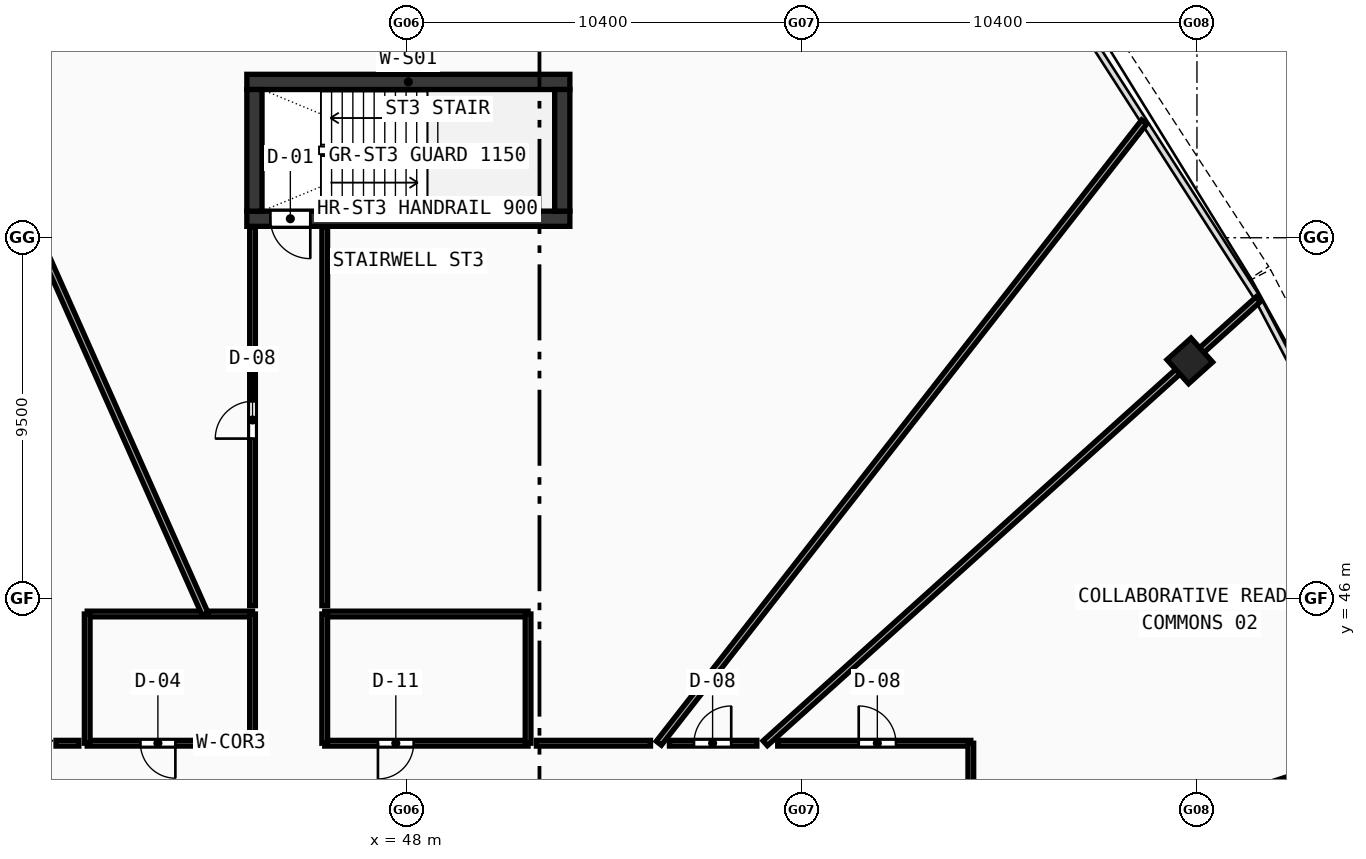
"""IFC4 building model, lengths in metres.
Left out: names, types, materials, properties, quantities, classifications, styles, units other than length and angle.
Written with IfcOpenShell. Run it as: python <this file> out.ifc"""

import sys

from ifc_helpers import new_model, si_unit, direction, frame, frame_2d, origin, origin_with_axes, origin_2d, place, context, subcontext, project, spatial, rectangle, hollow_rectangle, extrude, source, transform, mapped, element, fill, save


model = new_model("IFC4")
c1 = context("Model", 3, precision=1e-05, world=origin(), true_north=direction((0.0, 1.0)))
c2 = subcontext(c1, "Body", "Model", "MODEL_VIEW")
j1 = project(units=[si_unit("LENGTHUNIT", "METRE"), si_unit("PLANEANGLEUNIT", "RADIAN")], contexts=[c1])
p1 = place(None, origin())
s1 = spatial("IfcSite", under=j1, at=p1, CompositionType="ELEMENT")
p2 = place(p1, origin())
s2 = spatial("IfcBuilding", under=s1, at=p2, CompositionType="ELEMENT")
p3 = place(p2, frame((0.0, 0.0, 244.53)))
s3 = spatial("IfcBuildingStorey", under=s2, at=p3, CompositionType="ELEMENT", Elevation=244.53)
p4 = place(p3, frame((43.8, 59.6, 0.0), z_axis=(0.0, 0.0, 1.0), x_axis=(1.0, 0.0, 0.0)))
e1 = element("IfcWall", 1, at=p4, inside=s3, PredefinedType="SHEAR", context=c2, shape_type="SweptSolid", body=[
    extrude(rectangle(XDim=8.5, YDim=0.4, at=frame_2d((4.25, 0.0))), origin(), (0.0, 0.0, 1.0), 3.47),
])
p5 = place(p3, frame((43.8, 56.0, 0.0), z_axis=(0.0, 0.0, 1.0), x_axis=(1.0, 0.0, 0.0)))
e2 = element("IfcWall", 2, at=p5, inside=s3, PredefinedType="SHEAR", context=c2, shape_type="SweptSolid", body=[
    extrude(rectangle(XDim=8.5, YDim=0.4, at=frame_2d((4.25, 0.0))), origin(), (0.0, 0.0, 1.0), 3.47),
])
p6 = place(p5, frame((0.62, 0.0, 0.0)))
e3 = element("IfcOpeningElement", 3, at=p6, cuts=e2, PredefinedType="OPENING", context=c2, shape_type="SweptSolid", body=[
    extrude(rectangle(XDim=1.05, YDim=2.1, at=frame_2d((0.525, 1.05))), frame((0.0, 0.21, 0.0), z_axis=(0.0, -1.0, 0.0), x_axis=(1.0, 0.0, 0.0)), (0.0, 0.0, 1.0), 0.42),
])
for number, where, z_axis, x_axis in (
    (4, (44.0, 56.2, 0.0), (0.0, 0.0, 1.0), (0.0, 1.0, 0.0)),
    (5, (52.1, 56.2, 0.0), (0.0, 0.0, 1.0), (0.0, 1.0, 0.0)),
):
    element("IfcWall", number, at=place(p3, frame(where, z_axis=z_axis, x_axis=x_axis)), inside=s3, PredefinedType="SHEAR", context=c2, shape_type="SweptSolid", body=[
        extrude(rectangle(XDim=3.2, YDim=0.4, at=frame_2d((1.6, 0.0))), origin(), (0.0, 0.0, 1.0), 3.47),
    ])
m1 = source(origin(), c2, "Body", "SweptSolid", [
    extrude(hollow_rectangle(XDim=0.85, YDim=0.85, WallThickness=0.034, at=origin_2d()), origin(), (0.0, 0.0, 1.0), 3.73),
])
p7 = place(p3, frame((68.612, 52.259, -0.26), z_axis=(0.0, 0.0, 1.0), x_axis=(-0.669130606359, 0.743144825477, 0.0)))
e6 = element("IfcColumn", 6, at=p7, inside=s3, PredefinedType="COLUMN", context=c2, shape_type="MappedRepresentation", body=[
    mapped(m1, transform((0.0, 0.0, 0.0), scale=1.0)),
])
p8 = place(p3, frame((39.6, 42.2, 0.0), z_axis=(0.0, 0.0, 1.0), x_axis=(1.0, 0.0, 0.0)))
e7 = element("IfcWall", 7, at=p8, inside=s3, PredefinedType="PARTITIONING", context=c2, shape_type="SweptSolid", body=[
    extrude(rectangle(XDim=4.35, YDim=0.15, at=frame_2d((2.175, 0.0))), origin(), (0.0, 0.0, 1.0), 3.47),
])
p9 = place(p8, frame((1.4, 0.0, 0.0)))
e8 = element("IfcOpeningElement", 8, at=p9, cuts=e7, PredefinedType="OPENING", context=c2, shape_type="SweptSolid", body=[
    extrude(rectangle(XDim=0.92, YDim=2.1, at=frame_2d((0.46, 1.05))), frame((0.0, 0.085, 0.0), z_axis=(0.0, -1.0, 0.0), x_axis=(1.0, 0.0, 0.0)), (0.0, 0.0, 1.0), 0.17),
])
p10 = place(p3, frame((39.6, 45.6, 0.0), z_axis=(0.0, 0.0, 1.0), x_axis=(1.0, 0.0, 0.0)))
e9 = element("IfcWall", 9, at=p10, inside=s3, PredefinedType="PARTITIONING", context=c2, shape_type="SweptSolid", body=[
    extrude(rectangle(XDim=4.35, YDim=0.15, at=frame_2d((2.175, 0.0))), origin(), (0.0, 0.0, 1.0), 2.82),
])
p11 = place(p3, frame((39.6, 42.2, 0.0), z_axis=(0.0, 0.0, 1.0), x_axis=(0.0, 1.0, 0.0)))
e10 = element("IfcWall", 10, at=p11, inside=s3, PredefinedType="PARTITIONING", context=c2, shape_type="SweptSolid", body=[
    extrude(rectangle(XDim=3.4, YDim=0.15, at=frame_2d((1.7, 0.0))), origin(), (0.0, 0.0, 1.0), 3.47),
])
p12 = place(p3, frame((43.95, 42.2, 0.0), z_axis=(0.0, 0.0, 1.0), x_axis=(0.0, 1.0, 0.0)))
e11 = element("IfcWall", 11, at=p12, inside=s3, PredefinedType="PARTITIONING", context=c2, shape_type="SweptSolid", body=[
    extrude(rectangle(XDim=3.4, YDim=0.15, at=frame_2d((1.7, 0.0))), origin(), (0.0, 0.0, 1.0), 2.82),
])
p13 = place(p3, frame((45.85, 42.2, 0.0), z_axis=(0.0, 0.0, 1.0), x_axis=(1.0, 0.0, 0.0)))
e12 = element("IfcWall", 12, at=p13, inside=s3, PredefinedType="PARTITIONING", context=c2, shape_type="SweptSolid", body=[
    extrude(rectangle(XDim=5.35, YDim=0.15, at=frame_2d((2.675, 0.0))), origin(), (0.0, 0.0, 1.0), 3.47),
])
p14 = place(p13, frame((1.4, 0.0, 0.0)))
e13 = element("IfcOpeningElement", 13, at=p14, cuts=e12, PredefinedType="OPENING", context=c2, shape_type="SweptSolid", body=[
    extrude(rectangle(XDim=0.94, YDim=2.1, at=frame_2d((0.47, 1.05))), frame((0.0, 0.085, 0.0), z_axis=(0.0, -1.0, 0.0), x_axis=(1.0, 0.0, 0.0)), (0.0, 0.0, 1.0), 0.17),
])
p15 = place(p3, frame((45.85, 45.6, 0.0), z_axis=(0.0, 0.0, 1.0), x_axis=(1.0, 0.0, 0.0)))
e14 = element("IfcWall", 14, at=p15, inside=s3, PredefinedType="PARTITIONING", context=c2, shape_type="SweptSolid", body=[
    extrude(rectangle(XDim=5.35, YDim=0.15, at=frame_2d((2.675, 0.0))), origin(), (0.0, 0.0, 1.0), 3.47),
])
for number, where, z_axis, x_axis in (
    (15, (45.85, 42.2, 0.0), (0.0, 0.0, 1.0), (0.0, 1.0, 0.0)),
    (16, (51.2, 42.2, 0.0), (0.0, 0.0, 1.0), (0.0, 1.0, 0.0)),
):
    element("IfcWall", number, at=place(p3, frame(where, z_axis=z_axis, x_axis=x_axis)), inside=s3, PredefinedType="PARTITIONING", context=c2, shape_type="SweptSolid", body=[
        extrude(rectangle(XDim=3.4, YDim=0.15, at=frame_2d((1.7, 0.0))), origin(), (0.0, 0.0, 1.0), 3.47),
    ])
p16 = place(p3, frame((62.85, 38.525, 0.0), z_axis=(0.0, 0.0, 1.0), x_axis=(0.951060404644, 0.309005027011, 0.0)))
e17 = element("IfcWall", 17, at=p16, inside=s3, PredefinedType="PARTITIONING", context=c2, shape_type="SweptSolid", body=[
    extrude(rectangle(XDim=14.032, YDim=0.17, at=frame_2d((7.016, 0.0))), origin(), (0.0, 0.0, 1.0), 2.82),
])
p17 = place(p3, frame((57.44, 42.2, 0.0), z_axis=(0.0, 0.0, 1.0), x_axis=(0.743140424774, 0.669135493802, 0.0)))
e18 = element("IfcWall", 18, at=p17, inside=s3, PredefinedType="PARTITIONING", context=c2, shape_type="SweptSolid", body=[
    extrude(rectangle(XDim=17.455, YDim=0.17, at=frame_2d((8.728, 0.0))), origin(), (0.0, 0.0, 1.0), 2.82),
])
p18 = place(p3, frame((54.641, 42.2, 0.0), z_axis=(0.0, 0.0, 1.0), x_axis=(0.615664824624, 0.788008136837, 0.0)))
e19 = element("IfcWall", 19, at=p18, inside=s3, PredefinedType="PARTITIONING", context=c2, shape_type="SweptSolid", body=[
    extrude(rectangle(XDim=20.745, YDim=0.17, at=frame_2d((10.372, 0.0))), origin(), (0.0, 0.0, 1.0), 2.82),
])
p19 = place(p3, frame((42.702, 45.6, 0.0), z_axis=(0.0, 0.0, 1.0), x_axis=(-0.406745472033, 0.913541526686, 0.0)))
e20 = element("IfcWall", 20, at=p19, inside=s3, PredefinedType="PARTITIONING", context=c2, shape_type="SweptSolid", body=[
    extrude(rectangle(XDim=22.574, YDim=0.17, at=frame_2d((11.287, 0.0))), origin(), (0.0, 0.0, 1.0), 2.82),
])
p20 = place(p3, frame((38.78, 42.2, 0.0), z_axis=(0.0, 0.0, 1.0), x_axis=(1.0, 0.0, 0.0)))
e21 = element("IfcWall", 21, at=p20, inside=s3, PredefinedType="PARTITIONING", context=c2, shape_type="SweptSolid", body=[
    extrude(rectangle(XDim=0.6, YDim=0.15, at=frame_2d((0.3, 0.0))), origin(), (0.0, 0.0, 1.0), 2.82),
])
p21 = place(p3, frame((43.95, 45.82, 0.0), z_axis=(0.0, 0.0, 1.0), x_axis=(0.0, 1.0, 0.0)))
e22 = element("IfcWall", 22, at=p21, inside=s3, PredefinedType="PARTITIONING", context=c2, shape_type="SweptSolid", body=[
    extrude(rectangle(XDim=9.96, YDim=0.15, at=frame_2d((4.98, 0.0))), origin(), (0.0, 0.0, 1.0), 3.12),
])
p22 = place(p21, frame((4.395, 0.0, 0.0)))
e23 = element("IfcOpeningElement", 23, at=p22, cuts=e22, PredefinedType="OPENING", context=c2, shape_type="SweptSolid", body=[
    extrude(rectangle(XDim=0.98, YDim=2.12, at=frame_2d((0.49, 1.06))), frame((0.0, 0.085, 0.0), z_axis=(0.0, -1.0, 0.0), x_axis=(1.0, 0.0, 0.0)), (0.0, 0.0, 1.0), 0.17),
])
p23 = place(p3, frame((45.85, 55.78, 0.0), z_axis=(0.0, 0.0, 1.0), x_axis=(0.0, -1.0, 0.0)))
e24 = element("IfcWall", 24, at=p23, inside=s3, PredefinedType="PARTITIONING", context=c2, shape_type="SweptSolid", body=[
    extrude(rectangle(XDim=9.96, YDim=0.15, at=frame_2d((4.98, 0.0))), origin(), (0.0, 0.0, 1.0), 3.12),
])
p24 = place(p3, frame((51.42, 42.2, 0.0), z_axis=(0.0, 0.0, 1.0), x_axis=(1.0, 0.0, 0.0)))
e25 = element("IfcWall", 25, at=p24, inside=s3, PredefinedType="PARTITIONING", context=c2, shape_type="SweptSolid", body=[
    extrude(rectangle(XDim=3.001, YDim=0.15, at=frame_2d((1.5, 0.0))), origin(), (0.0, 0.0, 1.0), 2.82),
])
p25 = place(p3, frame((54.92, 42.2, 0.0), z_axis=(0.0, 0.0, 1.0), x_axis=(1.0, 0.0, 0.0)))
e26 = element("IfcWall", 26, at=p25, inside=s3, PredefinedType="PARTITIONING", context=c2, shape_type="SweptSolid", body=[
    extrude(rectangle(XDim=2.3, YDim=0.15, at=frame_2d((1.15, 0.0))), origin(), (0.0, 0.0, 1.0), 2.82),
])
p26 = place(p25, frame((0.646, 0.0, 0.0)))
e27 = element("IfcOpeningElement", 27, at=p26, cuts=e26, PredefinedType="OPENING", context=c2, shape_type="SweptSolid", body=[
    extrude(rectangle(XDim=0.98, YDim=2.12, at=frame_2d((0.49, 1.06))), frame((0.0, 0.085, 0.0), z_axis=(0.0, -1.0, 0.0), x_axis=(1.0, 0.0, 0.0)), (0.0, 0.0, 1.0), 0.17),
])
p27 = place(p3, frame((57.769, 42.2, 0.0), z_axis=(0.0, 0.0, 1.0), x_axis=(1.0, 0.0, 0.0)))
e28 = element("IfcWall", 28, at=p27, inside=s3, PredefinedType="PARTITIONING", context=c2, shape_type="SweptSolid", body=[
    extrude(rectangle(XDim=5.081, YDim=0.15, at=frame_2d((2.541, 0.0))), origin(), (0.0, 0.0, 1.0), 3.12),
])
p28 = place(p27, frame((2.131, 0.0, 0.0)))
e29 = element("IfcOpeningElement", 29, at=p28, cuts=e28, PredefinedType="OPENING", context=c2, shape_type="SweptSolid", body=[
    extrude(rectangle(XDim=0.98, YDim=2.12, at=frame_2d((0.49, 1.06))), frame((0.0, 0.085, 0.0), z_axis=(0.0, -1.0, 0.0), x_axis=(1.0, 0.0, 0.0)), (0.0, 0.0, 1.0), 0.17),
])
p29 = place(p3, frame((62.85, 42.2, 0.0), z_axis=(0.0, 0.0, 1.0), x_axis=(0.0, -1.0, 0.0)))
e30 = element("IfcWall", 30, at=p29, inside=s3, PredefinedType="PARTITIONING", context=c2, shape_type="SweptSolid", body=[
    extrude(rectangle(XDim=3.444, YDim=0.15, at=frame_2d((1.722, 0.0))), origin(), (0.0, 0.0, 1.0), 3.12),
])
m2 = source(origin(), c2, "Body", "SweptSolid", [
    extrude(rectangle(XDim=1.05, YDim=2.1, at=frame_2d((0.525, 1.05))), frame((0.0, 0.025, 0.0), z_axis=(0.0, -1.0, 0.0), x_axis=(1.0, 0.0, 0.0)), (0.0, 0.0, 1.0), 0.05),
])
p30 = place(p6, frame((1.05, 0.0, 0.0), z_axis=(0.0, 0.0, 1.0), x_axis=(-1.0, 0.0, 0.0)))
e31 = element("IfcDoor", 31, at=p30, inside=s3, OperationType="SINGLE_SWING_LEFT", PredefinedType="DOOR", context=c2, shape_type="MappedRepresentation", body=[
    mapped(m2, transform((0.0, 0.0, 0.0), scale=1.0)),
])
fill(e3, e31)
m3 = source(origin(), c2, "Body", "SweptSolid", [
    extrude(rectangle(XDim=0.92, YDim=2.1, at=frame_2d((0.46, 1.05))), frame((0.0, 0.025, 0.0), z_axis=(0.0, -1.0, 0.0), x_axis=(1.0, 0.0, 0.0)), (0.0, 0.0, 1.0), 0.05),
])
p31 = place(p9, frame((0.92, 0.0, 0.0), z_axis=(0.0, 0.0, 1.0), x_axis=(-1.0, 0.0, 0.0)))
e32 = element("IfcDoor", 32, at=p31, inside=s3, OperationType="SINGLE_SWING_LEFT", PredefinedType="DOOR", context=c2, shape_type="MappedRepresentation", body=[
    mapped(m3, transform((0.0, 0.0, 0.0), scale=1.0)),
])
fill(e8, e32)
m4 = source(origin(), c2, "Body", "SweptSolid", [
    extrude(rectangle(XDim=0.94, YDim=2.1, at=frame_2d((0.47, 1.05))), frame((0.0, 0.025, 0.0), z_axis=(0.0, -1.0, 0.0), x_axis=(1.0, 0.0, 0.0)), (0.0, 0.0, 1.0), 0.05),
])
p32 = place(p14, frame((0.94, 0.0, 0.0), z_axis=(0.0, 0.0, 1.0), x_axis=(-1.0, 0.0, 0.0)))
e33 = element("IfcDoor", 33, at=p32, inside=s3, OperationType="SINGLE_SWING_RIGHT", PredefinedType="DOOR", context=c2, shape_type="MappedRepresentation", body=[
    mapped(m4, transform((0.0, 0.0, 0.0), scale=1.0)),
])
fill(e13, e33)
m5 = source(origin(), c2, "Body", "SweptSolid", [
    extrude(rectangle(XDim=0.98, YDim=2.12, at=frame_2d((0.49, 1.06))), frame((0.0, 0.025, 0.0), z_axis=(0.0, -1.0, 0.0), x_axis=(1.0, 0.0, 0.0)), (0.0, 0.0, 1.0), 0.05),
])
p33 = place(p28, origin_with_axes())
e34 = element("IfcDoor", 34, at=p33, inside=s3, OperationType="SINGLE_SWING_LEFT", PredefinedType="DOOR", context=c2, shape_type="MappedRepresentation", body=[
    mapped(m5, transform((0.0, 0.0, 0.0), scale=1.0)),
])
fill(e29, e34)
p34 = place(p26, origin_with_axes())
e35 = element("IfcDoor", 35, at=p34, inside=s3, OperationType="SINGLE_SWING_RIGHT", PredefinedType="DOOR", context=c2, shape_type="MappedRepresentation", body=[
    mapped(m5, transform((0.0, 0.0, 0.0), scale=1.0)),
])
fill(e27, e35)
p35 = place(p22, origin_with_axes())
e36 = element("IfcDoor", 36, at=p35, inside=s3, OperationType="SINGLE_SWING_LEFT", PredefinedType="DOOR", context=c2, shape_type="MappedRepresentation", body=[
    mapped(m5, transform((0.0, 0.0, 0.0), scale=1.0)),
])
fill(e23, e36)
save(model, sys.argv[1])
